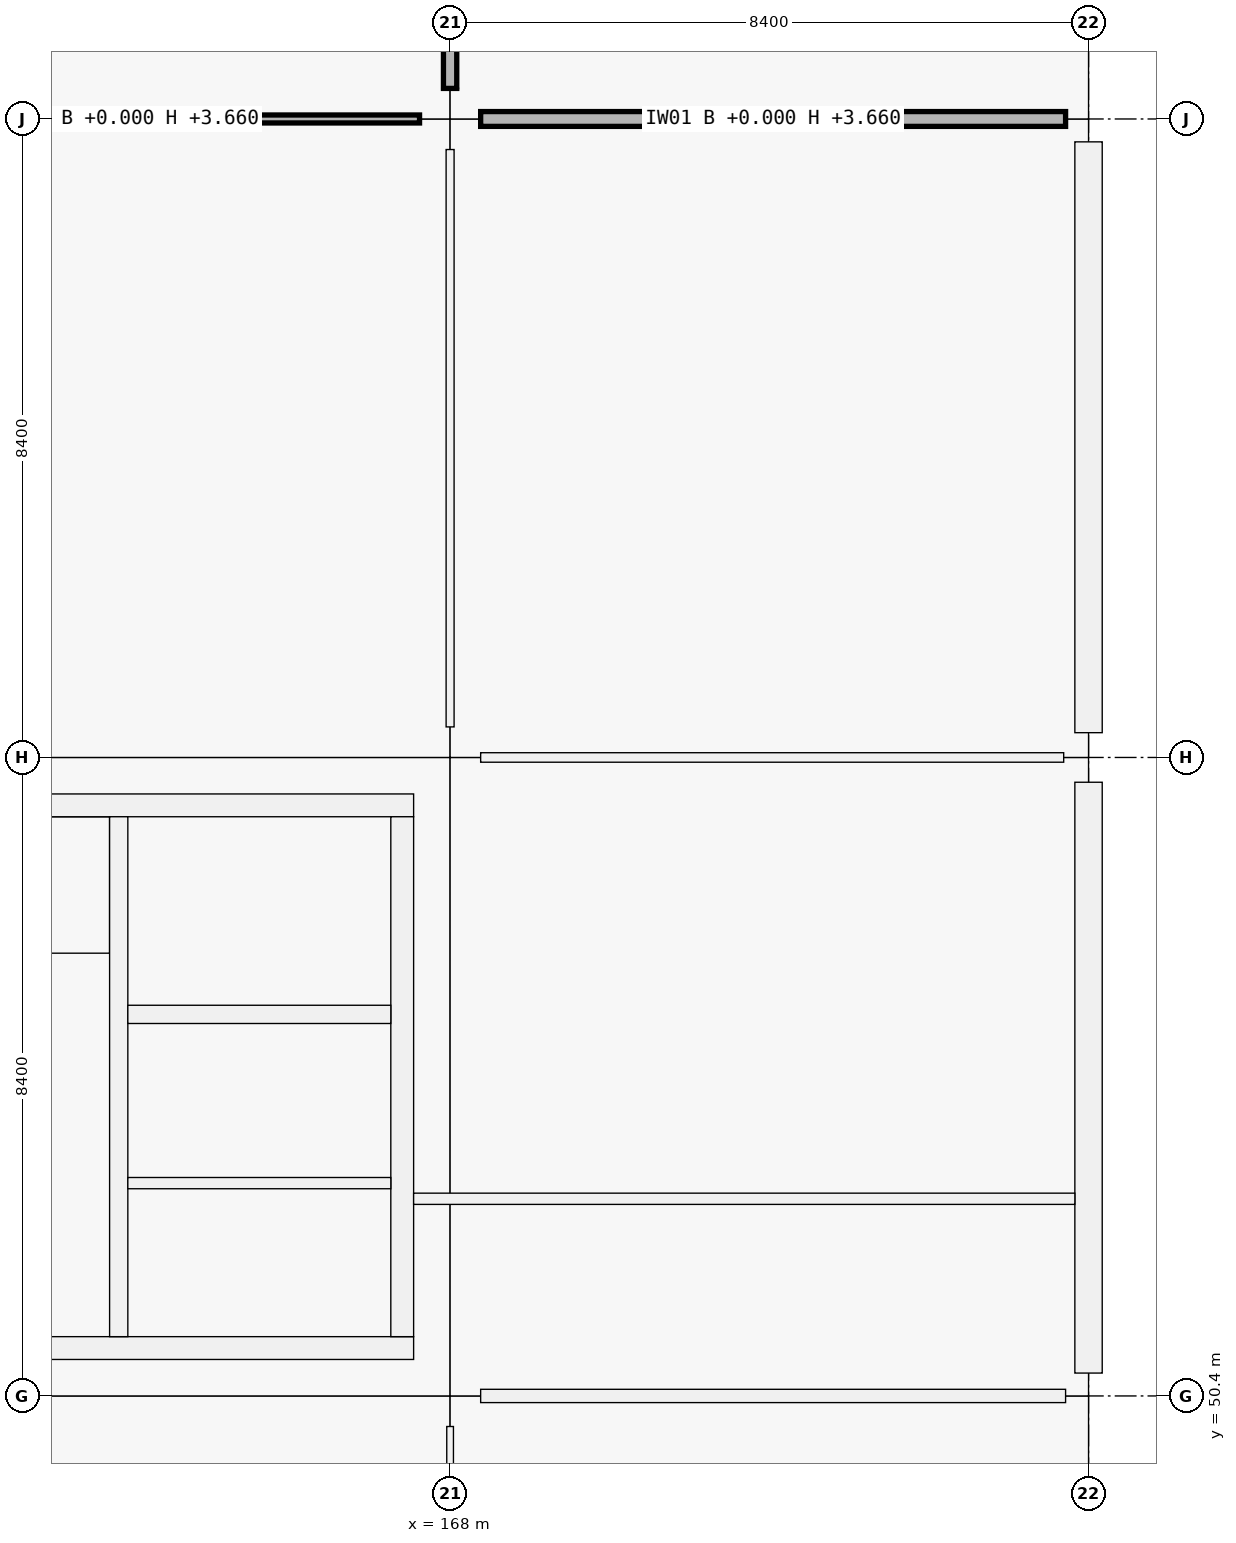
"""IFC4 building model, lengths in metres.
Left out: names, types, materials, properties, quantities, classifications, styles, units other than length and angle.
Written with IfcOpenShell. Run it as: python <this file> out.ifc"""

import sys

from ifc_helpers import new_model, si_unit, direction, frame, frame_2d, origin, origin_2d, place, context, subcontext, project, spatial, rectangle, extrude, element, fill, save


model = new_model("IFC4")
c1 = context("Model", 3, precision=1e-05, world=origin(), true_north=direction((0.0, 1.0)))
c2 = subcontext(c1, "Body", "Model", "MODEL_VIEW")
j1 = project(units=[si_unit("LENGTHUNIT", "METRE"), si_unit("PLANEANGLEUNIT", "RADIAN")], contexts=[c1])
p1 = place(None, origin())
s1 = spatial("IfcSite", under=j1, at=p1, CompositionType="ELEMENT")
p2 = place(p1, origin())
s2 = spatial("IfcBuilding", under=s1, at=p2, CompositionType="ELEMENT")
p3 = place(p2, origin())
s3 = spatial("IfcBuildingStorey", under=s2, at=p3, CompositionType="ELEMENT", Elevation=0.0)
for number, where, z_axis, x_axis in (
    (1, (168.0, 50.4, 0.0), (0.0, 0.0, 1.0), (1.0, 0.0, 0.0)),
    (2, (168.0, 58.8, 0.0), (0.0, 0.0, 1.0), (1.0, 0.0, 0.0)),
    (3, (168.0, 67.2, 0.0), (0.0, 0.0, 1.0), (1.0, 0.0, 0.0)),
):
    element("IfcColumn", number, at=place(p3, frame(where, z_axis=z_axis, x_axis=x_axis)), inside=s3, PredefinedType="COLUMN", context=c2, shape_type="SweptSolid", body=[
        extrude(rectangle(XDim=0.8, YDim=0.8, at=origin_2d()), origin(), (0.0, 0.0, 1.0), 5.76),
    ])
p4 = place(p3, frame((176.4, 50.4, 0.0), z_axis=(0.0, 0.0, 1.0), x_axis=(1.0, 0.0, 0.0)))
e4 = element("IfcColumn", 4, at=p4, inside=s3, PredefinedType="COLUMN", context=c2, shape_type="SweptSolid", body=[
    extrude(rectangle(XDim=0.6, YDim=0.6, at=origin_2d()), origin(), (0.0, 0.0, 1.0), 5.76),
])
p5 = place(p3, frame((176.4, 58.8, 0.0), z_axis=(0.0, 0.0, 1.0), x_axis=(1.0, 0.0, 0.0)))
e5 = element("IfcColumn", 5, at=p5, inside=s3, PredefinedType="COLUMN", context=c2, shape_type="SweptSolid", body=[
    extrude(rectangle(XDim=0.65, YDim=0.65, at=origin_2d()), origin(), (0.0, 0.0, 1.0), 5.76),
])
p6 = place(p3, frame((176.4, 67.2, 0.0), z_axis=(0.0, 0.0, 1.0), x_axis=(1.0, 0.0, 0.0)))
e6 = element("IfcColumn", 6, at=p6, inside=s3, PredefinedType="COLUMN", context=c2, shape_type="SweptSolid", body=[
    extrude(rectangle(XDim=0.6, YDim=0.6, at=origin_2d()), origin(), (0.0, 0.0, 1.0), 5.76),
])
p7 = place(p3, frame((176.4, 58.474, 0.0), z_axis=(0.0, 0.0, 1.0), x_axis=(0.0, -1.0, 0.0)))
e7 = element("IfcWall", 7, at=p7, inside=s3, PredefinedType="SOLIDWALL", context=c2, shape_type="SweptSolid", body=[
    extrude(rectangle(XDim=7.773, YDim=0.36, at=frame_2d((3.887, 0.0))), origin(), (0.0, 0.0, 1.0), 4.7),
])
p8 = place(p7, frame((2.886, 0.0, 0.0)))
e8 = element("IfcOpeningElement", 8, at=p8, cuts=e7, PredefinedType="OPENING", context=c2, shape_type="SweptSolid", body=[
    extrude(rectangle(XDim=2.0, YDim=2.25, at=frame_2d((1.0, 1.125))), frame((0.0, 0.18, 0.0), z_axis=(0.0, -1.0, 0.0), x_axis=(1.0, 0.0, 0.0)), (0.0, 0.0, 1.0), 0.36),
])
p9 = place(p7, frame((5.624, 0.0, 0.0)))
e9 = element("IfcOpeningElement", 9, at=p9, cuts=e7, PredefinedType="OPENING", context=c2, shape_type="SweptSolid", body=[
    extrude(rectangle(XDim=2.0, YDim=2.25, at=frame_2d((1.0, 1.125))), frame((0.0, 0.18, 0.0), z_axis=(0.0, -1.0, 0.0), x_axis=(1.0, 0.0, 0.0)), (0.0, 0.0, 1.0), 0.36),
])
p10 = place(p3, frame((176.4, 66.899, 0.0), z_axis=(0.0, 0.0, 1.0), x_axis=(0.0, -1.0, 0.0)))
e10 = element("IfcWall", 10, at=p10, inside=s3, PredefinedType="SOLIDWALL", context=c2, shape_type="SweptSolid", body=[
    extrude(rectangle(XDim=7.773, YDim=0.36, at=frame_2d((3.886, 0.0))), origin(), (0.0, 0.0, 1.0), 4.7),
])
p11 = place(p10, frame((3.286, 0.0, 0.9)))
e11 = element("IfcOpeningElement", 11, at=p11, cuts=e10, PredefinedType="OPENING", context=c2, shape_type="SweptSolid", body=[
    extrude(rectangle(XDim=1.2, YDim=2.1, at=frame_2d((0.6, 1.05))), frame((0.0, 0.18, 0.0), z_axis=(0.0, -1.0, 0.0), x_axis=(1.0, 0.0, 0.0)), (0.0, 0.0, 1.0), 0.36),
])
p12 = place(p3, frame((167.52, 51.03, 0.0), z_axis=(0.0, 0.0, 1.0), x_axis=(-1.0, 0.0, 0.0)))
e12 = element("IfcWall", 12, at=p12, inside=s3, PredefinedType="SHEAR", context=c2, shape_type="SweptSolid", body=[
    extrude(rectangle(XDim=7.44, YDim=0.3, at=frame_2d((3.72, 0.0))), origin(), (0.0, 0.0, 1.0), 5.76),
])
p13 = place(p12, frame((1.28, 0.0, 0.0)))
e13 = element("IfcOpeningElement", 13, at=p13, cuts=e12, PredefinedType="OPENING", context=c2, shape_type="SweptSolid", body=[
    extrude(rectangle(XDim=1.5, YDim=2.15, at=frame_2d((0.75, 1.075))), frame((0.0, 0.15, 0.0), z_axis=(0.0, -1.0, 0.0), x_axis=(1.0, 0.0, 0.0)), (0.0, 0.0, 1.0), 0.3),
])
p14 = place(p3, frame((160.08, 58.17, 0.0), z_axis=(0.0, 0.0, 1.0), x_axis=(1.0, 0.0, 0.0)))
e14 = element("IfcWall", 14, at=p14, inside=s3, PredefinedType="SHEAR", context=c2, shape_type="SweptSolid", body=[
    extrude(rectangle(XDim=7.44, YDim=0.3, at=frame_2d((3.72, 0.0))), origin(), (0.0, 0.0, 1.0), 5.76),
])
p15 = place(p3, frame((167.37, 58.02, 0.0), z_axis=(0.0, 0.0, 1.0), x_axis=(0.0, -1.0, 0.0)))
e15 = element("IfcWall", 15, at=p15, inside=s3, PredefinedType="SHEAR", context=c2, shape_type="SweptSolid", body=[
    extrude(rectangle(XDim=6.84, YDim=0.3, at=frame_2d((3.42, 0.0))), origin(), (0.0, 0.0, 1.0), 5.76),
])
p16 = place(p15, frame((5.12, 0.0, 0.0)))
e16 = element("IfcOpeningElement", 16, at=p16, cuts=e15, PredefinedType="OPENING", context=c2, shape_type="SweptSolid", body=[
    extrude(rectangle(XDim=1.5, YDim=2.15, at=frame_2d((0.75, 1.075))), frame((0.0, 0.15, 0.0), z_axis=(0.0, -1.0, 0.0), x_axis=(1.0, 0.0, 0.0)), (0.0, 0.0, 1.0), 0.3),
])
p17 = place(p3, frame((163.64, 51.18, 0.0), z_axis=(0.0, 0.0, 1.0), x_axis=(0.0, 1.0, 0.0)))
e17 = element("IfcWall", 17, at=p17, inside=s3, PredefinedType="SHEAR", context=c2, shape_type="SweptSolid", body=[
    extrude(rectangle(XDim=6.84, YDim=0.24, at=frame_2d((3.42, 0.0))), origin(), (0.0, 0.0, 1.0), 5.76),
])
p18 = place(p17, frame((0.12, 0.0, 0.0)))
e18 = element("IfcOpeningElement", 18, at=p18, cuts=e17, PredefinedType="OPENING", context=c2, shape_type="SweptSolid", body=[
    extrude(rectangle(XDim=1.0, YDim=2.15, at=frame_2d((0.5, 1.075))), frame((0.0, 0.12, 0.0), z_axis=(0.0, -1.0, 0.0), x_axis=(1.0, 0.0, 0.0)), (0.0, 0.0, 1.0), 0.24),
])
p19 = place(p3, frame((163.76, 55.42, 0.0), z_axis=(0.0, 0.0, 1.0), x_axis=(1.0, 0.0, 0.0)))
e19 = element("IfcWall", 19, at=p19, inside=s3, PredefinedType="SHEAR", context=c2, shape_type="SweptSolid", body=[
    extrude(rectangle(XDim=3.46, YDim=0.24, at=frame_2d((1.73, 0.0))), origin(), (0.0, 0.0, 1.0), 5.76),
])
p20 = place(p19, frame((1.08, 0.0, 0.0)))
e20 = element("IfcOpeningElement", 20, at=p20, cuts=e19, PredefinedType="OPENING", context=c2, shape_type="SweptSolid", body=[
    extrude(rectangle(XDim=1.3, YDim=2.25, at=frame_2d((0.65, 1.125))), frame((0.0, 0.12, 0.0), z_axis=(0.0, -1.0, 0.0), x_axis=(1.0, 0.0, 0.0)), (0.0, 0.0, 1.0), 0.24),
])
p21 = place(p3, frame((167.22, 53.2, 0.0), z_axis=(0.0, 0.0, 1.0), x_axis=(-1.0, 0.0, 0.0)))
e21 = element("IfcWall", 21, at=p21, inside=s3, PredefinedType="PARTITIONING", context=c2, shape_type="SweptSolid", body=[
    extrude(rectangle(XDim=3.46, YDim=0.148, at=frame_2d((1.73, 0.0))), origin(), (0.0, 0.0, 1.0), 5.51),
])
p22 = place(p21, frame((0.98, 0.0, 0.0)))
e22 = element("IfcOpeningElement", 22, at=p22, cuts=e21, PredefinedType="OPENING", context=c2, shape_type="SweptSolid", body=[
    extrude(rectangle(XDim=1.5, YDim=2.15, at=frame_2d((0.75, 1.075))), frame((0.0, 0.074, 0.0), z_axis=(0.0, -1.0, 0.0), x_axis=(1.0, 0.0, 0.0)), (0.0, 0.0, 1.0), 0.148),
])
p23 = place(p3, frame((160.002, 67.2, 0.0), z_axis=(0.0, 0.0, 1.0), x_axis=(1.0, 0.0, 0.0)))
e23 = element("IfcWall", 23, at=p23, inside=s3, PredefinedType="PARTITIONING", context=c2, shape_type="SweptSolid", body=[
    extrude(rectangle(XDim=7.596, YDim=0.105, at=frame_2d((3.798, 0.0))), origin(), (0.0, 0.0, 1.0), 3.66),
])
p24 = place(p23, frame((3.273, 0.0, 0.0)))
e24 = element("IfcOpeningElement", 24, at=p24, cuts=e23, PredefinedType="OPENING", context=c2, shape_type="SweptSolid", body=[
    extrude(rectangle(XDim=1.05, YDim=2.12, at=frame_2d((0.525, 1.06))), frame((0.0, 0.052, 0.0), z_axis=(0.0, -1.0, 0.0), x_axis=(1.0, 0.0, 0.0)), (0.0, 0.0, 1.0), 0.105),
])
p25 = place(p3, frame((168.402, 50.4, 0.0), z_axis=(0.0, 0.0, 1.0), x_axis=(1.0, 0.0, 0.0)))
e25 = element("IfcWall", 25, at=p25, inside=s3, PredefinedType="PARTITIONING", context=c2, shape_type="SweptSolid", body=[
    extrude(rectangle(XDim=7.696, YDim=0.175, at=frame_2d((3.848, 0.0))), origin(), (0.0, 0.0, 1.0), 3.66),
])
p26 = place(p25, frame((3.308, 0.0, 0.0)))
e26 = element("IfcOpeningElement", 26, at=p26, cuts=e25, PredefinedType="OPENING", context=c2, shape_type="SweptSolid", body=[
    extrude(rectangle(XDim=1.08, YDim=2.25, at=frame_2d((0.54, 1.125))), frame((0.0, 0.087, 0.0), z_axis=(0.0, -1.0, 0.0), x_axis=(1.0, 0.0, 0.0)), (0.0, 0.0, 1.0), 0.175),
])
p27 = place(p3, frame((168.402, 58.8, 0.0), z_axis=(0.0, 0.0, 1.0), x_axis=(1.0, 0.0, 0.0)))
e27 = element("IfcWall", 27, at=p27, inside=s3, PredefinedType="PARTITIONING", context=c2, shape_type="SweptSolid", body=[
    extrude(rectangle(XDim=7.671, YDim=0.125, at=frame_2d((3.835, 0.0))), origin(), (0.0, 0.0, 1.0), 3.66),
])
p28 = place(p27, frame((3.306, 0.0, 0.0)))
e28 = element("IfcOpeningElement", 28, at=p28, cuts=e27, PredefinedType="OPENING", context=c2, shape_type="SweptSolid", body=[
    extrude(rectangle(XDim=1.06, YDim=2.25, at=frame_2d((0.53, 1.125))), frame((0.0, 0.062, 0.0), z_axis=(0.0, -1.0, 0.0), x_axis=(1.0, 0.0, 0.0)), (0.0, 0.0, 1.0), 0.125),
])
p29 = place(p3, frame((168.402, 67.2, 0.0), z_axis=(0.0, 0.0, 1.0), x_axis=(1.0, 0.0, 0.0)))
e29 = element("IfcWall", 29, at=p29, inside=s3, PredefinedType="PARTITIONING", context=c2, shape_type="SweptSolid", body=[
    extrude(rectangle(XDim=7.696, YDim=0.195, at=frame_2d((3.848, 0.0))), origin(), (0.0, 0.0, 1.0), 3.66),
])
p30 = place(p29, frame((3.328, 0.0, 0.0)))
e30 = element("IfcOpeningElement", 30, at=p30, cuts=e29, PredefinedType="OPENING", context=c2, shape_type="SweptSolid", body=[
    extrude(rectangle(XDim=1.04, YDim=2.2, at=frame_2d((0.52, 1.1))), frame((0.0, 0.098, 0.0), z_axis=(0.0, -1.0, 0.0), x_axis=(1.0, 0.0, 0.0)), (0.0, 0.0, 1.0), 0.195),
])
p31 = place(p3, frame((168.0, 42.402, 0.0), z_axis=(0.0, 0.0, 1.0), x_axis=(0.0, 1.0, 0.0)))
e31 = element("IfcWall", 31, at=p31, inside=s3, PredefinedType="PARTITIONING", context=c2, shape_type="SweptSolid", body=[
    extrude(rectangle(XDim=7.596, YDim=0.088, at=frame_2d((3.798, 0.0))), origin(), (0.0, 0.0, 1.0), 3.66),
])
p32 = place(p31, frame((3.313, 0.0, 0.0)))
e32 = element("IfcOpeningElement", 32, at=p32, cuts=e31, PredefinedType="OPENING", context=c2, shape_type="SweptSolid", body=[
    extrude(rectangle(XDim=0.97, YDim=2.12, at=frame_2d((0.485, 1.06))), frame((0.0, 0.044, 0.0), z_axis=(0.0, -1.0, 0.0), x_axis=(1.0, 0.0, 0.0)), (0.0, 0.0, 1.0), 0.088),
])
p33 = place(p3, frame((168.0, 59.202, 0.0), z_axis=(0.0, 0.0, 1.0), x_axis=(0.0, 1.0, 0.0)))
e33 = element("IfcWall", 33, at=p33, inside=s3, PredefinedType="PARTITIONING", context=c2, shape_type="SweptSolid", body=[
    extrude(rectangle(XDim=7.596, YDim=0.105, at=frame_2d((3.798, 0.0))), origin(), (0.0, 0.0, 1.0), 3.66),
])
p34 = place(p33, frame((3.258, 0.0, 0.0)))
e34 = element("IfcOpeningElement", 34, at=p34, cuts=e33, PredefinedType="OPENING", context=c2, shape_type="SweptSolid", body=[
    extrude(rectangle(XDim=1.08, YDim=2.25, at=frame_2d((0.54, 1.125))), frame((0.0, 0.052, 0.0), z_axis=(0.0, -1.0, 0.0), x_axis=(1.0, 0.0, 0.0)), (0.0, 0.0, 1.0), 0.105),
])
p35 = place(p3, frame((168.0, 67.602, 0.0), z_axis=(0.0, 0.0, 1.0), x_axis=(0.0, 1.0, 0.0)))
e35 = element("IfcWall", 35, at=p35, inside=s3, PredefinedType="PARTITIONING", context=c2, shape_type="SweptSolid", body=[
    extrude(rectangle(XDim=7.696, YDim=0.175, at=frame_2d((3.848, 0.0))), origin(), (0.0, 0.0, 1.0), 3.66),
])
p36 = place(p35, frame((3.318, 0.0, 0.0)))
e36 = element("IfcOpeningElement", 36, at=p36, cuts=e35, PredefinedType="OPENING", context=c2, shape_type="SweptSolid", body=[
    extrude(rectangle(XDim=1.06, YDim=2.25, at=frame_2d((0.53, 1.125))), frame((0.0, 0.087, 0.0), z_axis=(0.0, -1.0, 0.0), x_axis=(1.0, 0.0, 0.0)), (0.0, 0.0, 1.0), 0.175),
])
p37 = place(p3, frame((167.52, 52.994, 0.0), z_axis=(0.0, 0.0, 1.0), x_axis=(1.0, 0.0, 0.0)))
e37 = element("IfcWall", 37, at=p37, inside=s3, PredefinedType="PARTITIONING", context=c2, shape_type="SweptSolid", body=[
    extrude(rectangle(XDim=8.7, YDim=0.148, at=frame_2d((4.35, 0.0))), origin(), (0.0, 0.0, 1.0), 3.66),
])
p38 = place(p8, origin())
e38 = element("IfcDoor", 38, at=p38, inside=s3, OperationType="DOUBLE_DOOR_SINGLE_SWING", PredefinedType="DOOR", context=c2, shape_type="SweptSolid", body=[
    extrude(rectangle(XDim=2.0, YDim=2.25, at=frame_2d((1.0, 1.125))), frame((0.0, 0.025, 0.0), z_axis=(0.0, -1.0, 0.0), x_axis=(1.0, 0.0, 0.0)), (0.0, 0.0, 1.0), 0.05),
])
fill(e8, e38)
p39 = place(p9, origin())
e39 = element("IfcDoor", 39, at=p39, inside=s3, OperationType="DOUBLE_DOOR_SINGLE_SWING", PredefinedType="DOOR", context=c2, shape_type="SweptSolid", body=[
    extrude(rectangle(XDim=2.0, YDim=2.25, at=frame_2d((1.0, 1.125))), frame((0.0, 0.025, 0.0), z_axis=(0.0, -1.0, 0.0), x_axis=(1.0, 0.0, 0.0)), (0.0, 0.0, 1.0), 0.05),
])
fill(e9, e39)
p40 = place(p11, origin())
e40 = element("IfcWindow", 40, at=p40, inside=s3, PartitioningType="SINGLE_PANEL", PredefinedType="WINDOW", context=c2, shape_type="SweptSolid", body=[
    extrude(rectangle(XDim=1.2, YDim=2.1, at=frame_2d((0.6, 1.05))), frame((0.0, 0.03, 0.0), z_axis=(0.0, -1.0, 0.0), x_axis=(1.0, 0.0, 0.0)), (0.0, 0.0, 1.0), 0.06),
])
fill(e11, e40)
p41 = place(p18, origin())
e41 = element("IfcDoor", 41, at=p41, inside=s3, OperationType="SINGLE_SWING_LEFT", PredefinedType="DOOR", context=c2, shape_type="SweptSolid", body=[
    extrude(rectangle(XDim=1.0, YDim=2.15, at=frame_2d((0.5, 1.075))), frame((0.0, 0.025, 0.0), z_axis=(0.0, -1.0, 0.0), x_axis=(1.0, 0.0, 0.0)), (0.0, 0.0, 1.0), 0.05),
])
fill(e18, e41)
p42 = place(p13, origin())
e42 = element("IfcDoor", 42, at=p42, inside=s3, OperationType="DOUBLE_DOOR_SINGLE_SWING", PredefinedType="DOOR", context=c2, shape_type="SweptSolid", body=[
    extrude(rectangle(XDim=1.5, YDim=2.15, at=frame_2d((0.75, 1.075))), frame((0.0, 0.025, 0.0), z_axis=(0.0, -1.0, 0.0), x_axis=(1.0, 0.0, 0.0)), (0.0, 0.0, 1.0), 0.05),
])
fill(e13, e42)
p43 = place(p16, origin())
e43 = element("IfcDoor", 43, at=p43, inside=s3, OperationType="DOUBLE_DOOR_SINGLE_SWING", PredefinedType="DOOR", context=c2, shape_type="SweptSolid", body=[
    extrude(rectangle(XDim=1.5, YDim=2.15, at=frame_2d((0.75, 1.075))), frame((0.0, 0.025, 0.0), z_axis=(0.0, -1.0, 0.0), x_axis=(1.0, 0.0, 0.0)), (0.0, 0.0, 1.0), 0.05),
])
fill(e16, e43)
p44 = place(p20, origin())
e44 = element("IfcDoor", 44, at=p44, inside=s3, OperationType="DOUBLE_DOOR_SLIDING", PredefinedType="DOOR", context=c2, shape_type="SweptSolid", body=[
    extrude(rectangle(XDim=1.3, YDim=2.25, at=frame_2d((0.65, 1.125))), frame((0.0, 0.025, 0.0), z_axis=(0.0, -1.0, 0.0), x_axis=(1.0, 0.0, 0.0)), (0.0, 0.0, 1.0), 0.05),
])
fill(e20, e44)
p45 = place(p22, origin())
e45 = element("IfcDoor", 45, at=p45, inside=s3, OperationType="DOUBLE_DOOR_SINGLE_SWING", PredefinedType="DOOR", context=c2, shape_type="SweptSolid", body=[
    extrude(rectangle(XDim=1.5, YDim=2.15, at=frame_2d((0.75, 1.075))), frame((0.0, 0.025, 0.0), z_axis=(0.0, -1.0, 0.0), x_axis=(1.0, 0.0, 0.0)), (0.0, 0.0, 1.0), 0.05),
])
fill(e22, e45)
p46 = place(p24, origin())
e46 = element("IfcDoor", 46, at=p46, inside=s3, OperationType="SINGLE_SWING_RIGHT", PredefinedType="DOOR", context=c2, shape_type="SweptSolid", body=[
    extrude(rectangle(XDim=1.05, YDim=2.12, at=frame_2d((0.525, 1.06))), frame((0.0, 0.025, 0.0), z_axis=(0.0, -1.0, 0.0), x_axis=(1.0, 0.0, 0.0)), (0.0, 0.0, 1.0), 0.05),
])
fill(e24, e46)
p47 = place(p26, origin())
e47 = element("IfcDoor", 47, at=p47, inside=s3, OperationType="SINGLE_SWING_RIGHT", PredefinedType="DOOR", context=c2, shape_type="SweptSolid", body=[
    extrude(rectangle(XDim=1.08, YDim=2.25, at=frame_2d((0.54, 1.125))), frame((0.0, 0.025, 0.0), z_axis=(0.0, -1.0, 0.0), x_axis=(1.0, 0.0, 0.0)), (0.0, 0.0, 1.0), 0.05),
])
fill(e26, e47)
p48 = place(p28, origin())
e48 = element("IfcDoor", 48, at=p48, inside=s3, OperationType="SINGLE_SWING_LEFT", PredefinedType="DOOR", context=c2, shape_type="SweptSolid", body=[
    extrude(rectangle(XDim=1.06, YDim=2.25, at=frame_2d((0.53, 1.125))), frame((0.0, 0.025, 0.0), z_axis=(0.0, -1.0, 0.0), x_axis=(1.0, 0.0, 0.0)), (0.0, 0.0, 1.0), 0.05),
])
fill(e28, e48)
p49 = place(p30, origin())
e49 = element("IfcDoor", 49, at=p49, inside=s3, OperationType="SINGLE_SWING_RIGHT", PredefinedType="DOOR", context=c2, shape_type="SweptSolid", body=[
    extrude(rectangle(XDim=1.04, YDim=2.2, at=frame_2d((0.52, 1.1))), frame((0.0, 0.025, 0.0), z_axis=(0.0, -1.0, 0.0), x_axis=(1.0, 0.0, 0.0)), (0.0, 0.0, 1.0), 0.05),
])
fill(e30, e49)
p50 = place(p34, origin())
e50 = element("IfcDoor", 50, at=p50, inside=s3, OperationType="SINGLE_SWING_LEFT", PredefinedType="DOOR", context=c2, shape_type="SweptSolid", body=[
    extrude(rectangle(XDim=1.08, YDim=2.25, at=frame_2d((0.54, 1.125))), frame((0.0, 0.025, 0.0), z_axis=(0.0, -1.0, 0.0), x_axis=(1.0, 0.0, 0.0)), (0.0, 0.0, 1.0), 0.05),
])
fill(e34, e50)
save(model, sys.argv[1])
